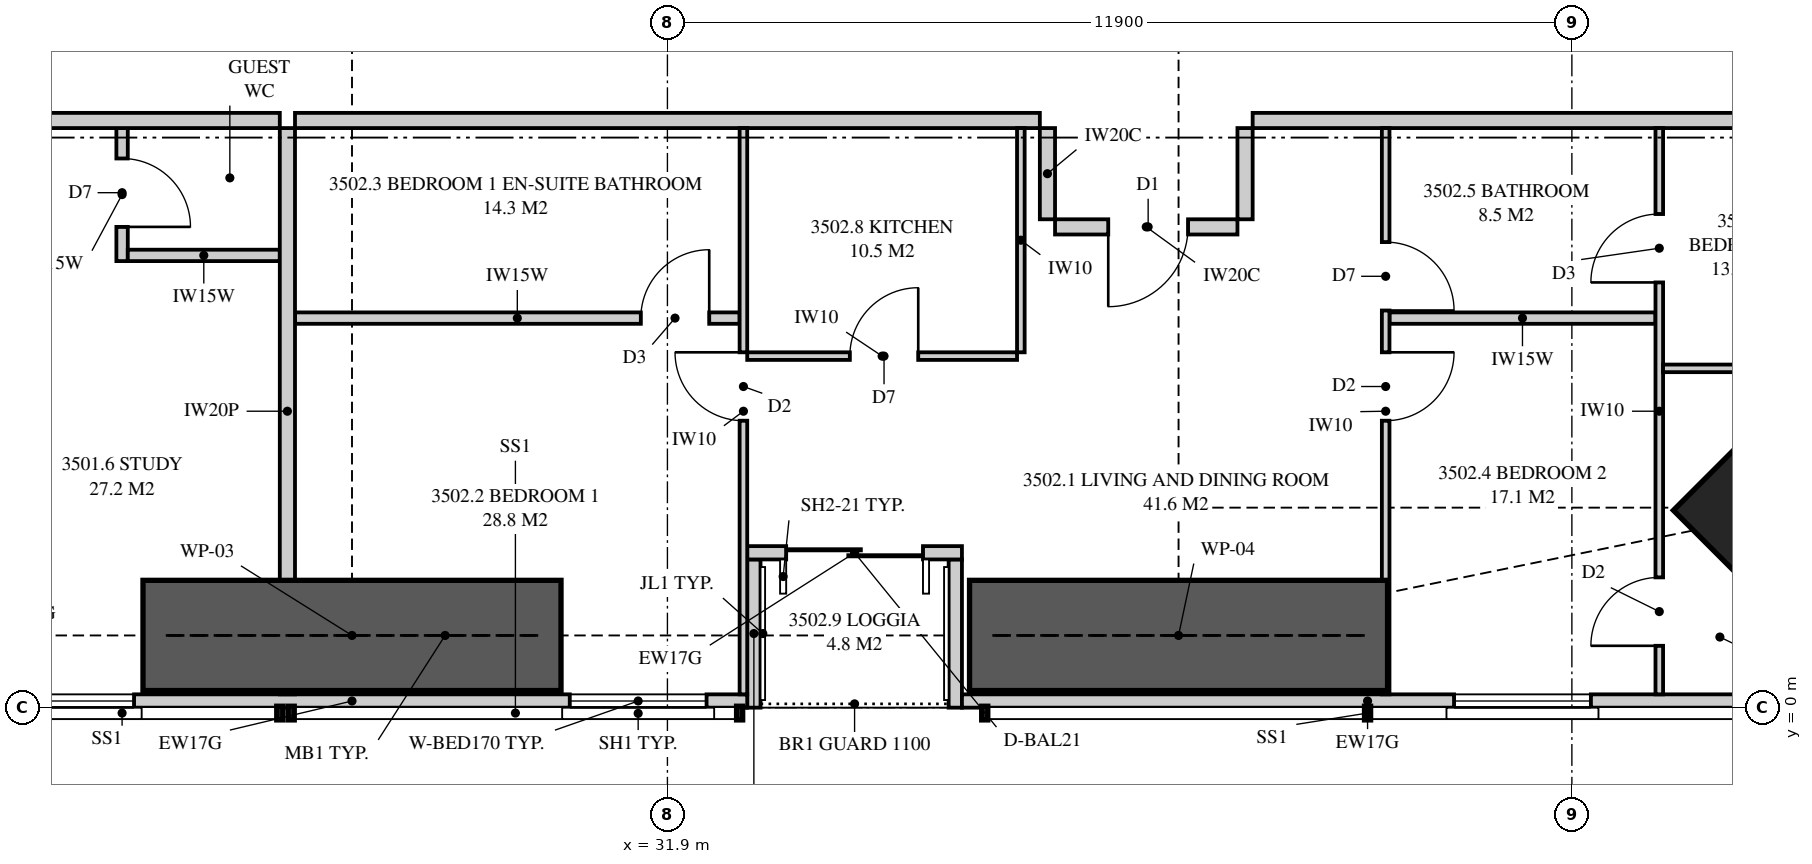
"""IFC4 building model, lengths in metres.
Left out: names, types, materials, properties, quantities, classifications, styles, units other than length and angle.
Written with IfcOpenShell. Run it as: python <this file> out.ifc"""

import sys

from ifc_helpers import new_model, si_unit, direction, frame, frame_2d, origin, origin_2d, place, context, subcontext, project, spatial, polyline, rectangle, outline, extrude, element, fill, save


model = new_model("IFC4")
c1 = context("Model", 3, precision=1e-05, world=origin(), true_north=direction((0.0, 1.0)))
c2 = subcontext(c1, "Body", "Model", "MODEL_VIEW")
j1 = project(units=[si_unit("LENGTHUNIT", "METRE"), si_unit("PLANEANGLEUNIT", "RADIAN")], contexts=[c1])
p1 = place(None, origin())
s1 = spatial("IfcSite", under=j1, at=p1, CompositionType="ELEMENT")
p2 = place(p1, origin())
s2 = spatial("IfcBuilding", under=s1, at=p2, CompositionType="ELEMENT")
p3 = place(p2, frame((0.0, 0.0, 128.3)))
s3 = spatial("IfcBuildingStorey", under=s2, at=p3, CompositionType="ELEMENT", Elevation=128.3)
p4 = place(p3, frame((46.869, 2.631, 0.0), z_axis=(0.0, 0.0, 1.0), x_axis=(-0.707106781187, 0.707106781187, 0.0)))
e1 = element("IfcColumn", 1, at=p4, inside=s3, PredefinedType="COLUMN", context=c2, shape_type="SweptSolid", body=[
    extrude(rectangle(XDim=2.4, YDim=2.5, at=origin_2d()), origin(), (0.0, 0.0, 1.0), 3.35),
])
p5 = place(p3, frame((22.55, 0.087, 0.0), z_axis=(0.0, 0.0, 1.0), x_axis=(1.0, 0.0, 0.0)))
e2 = element("IfcWall", 2, at=p5, inside=s3, PredefinedType="SOLIDWALL", context=c2, shape_type="SweptSolid", body=[
    extrude(rectangle(XDim=10.4, YDim=0.175, at=frame_2d((5.2, 0.0))), origin(), (0.0, 0.0, 1.0), 2.15),
])
p6 = place(p5, frame((0.532, 0.0, 0.4)))
e3 = element("IfcOpeningElement", 3, at=p6, cuts=e2, PredefinedType="OPENING", context=c2, shape_type="SweptSolid", body=[
    extrude(rectangle(XDim=1.8, YDim=1.7, at=frame_2d((0.9, 0.85))), frame((0.0, 0.097, 0.0), z_axis=(0.0, -1.0, 0.0), x_axis=(1.0, 0.0, 0.0)), (0.0, 0.0, 1.0), 0.195),
])
p7 = place(p5, frame((8.065, 0.0, 0.4)))
e4 = element("IfcOpeningElement", 4, at=p7, cuts=e2, PredefinedType="OPENING", context=c2, shape_type="SweptSolid", body=[
    extrude(rectangle(XDim=1.8, YDim=1.7, at=frame_2d((0.9, 0.85))), frame((0.0, 0.097, 0.0), z_axis=(0.0, -1.0, 0.0), x_axis=(1.0, 0.0, 0.0)), (0.0, 0.0, 1.0), 0.195),
])
p8 = place(p3, frame((35.775, 0.087, 0.0), z_axis=(0.0, 0.0, 1.0), x_axis=(1.0, 0.0, 0.0)))
e5 = element("IfcWall", 5, at=p8, inside=s3, PredefinedType="SOLIDWALL", context=c2, shape_type="SweptSolid", body=[
    extrude(outline(polyline([(0.0, 0.0), (10.674, 0.0), (10.674, 3.11), (3.053, 3.11), (3.053, 2.15), (3.008, 2.15), (3.008, 3.11), (2.85, 3.11), (2.85, 2.15), (0.0, 2.15), (0.0, 0.0)])), frame((0.0, 0.087, 0.0), z_axis=(0.0, -1.0, 0.0), x_axis=(1.0, 0.0, 0.0)), (0.0, 0.0, 1.0), 0.175),
])
p9 = place(p8, frame((6.475, 0.0, 0.4)))
e6 = element("IfcOpeningElement", 6, at=p9, cuts=e5, PredefinedType="OPENING", context=c2, shape_type="SweptSolid", body=[
    extrude(rectangle(XDim=1.8, YDim=1.7, at=frame_2d((0.9, 0.85))), frame((0.0, 0.097, 0.0), z_axis=(0.0, -1.0, 0.0), x_axis=(1.0, 0.0, 0.0)), (0.0, 0.0, 1.0), 0.195),
])
p10 = place(p3, frame((32.95, 2.038, 0.0), z_axis=(0.0, 0.0, 1.0), x_axis=(1.0, 0.0, 0.0)))
e7 = element("IfcWall", 7, at=p10, inside=s3, PredefinedType="SOLIDWALL", context=c2, shape_type="SweptSolid", body=[
    extrude(rectangle(XDim=2.825, YDim=0.175, at=frame_2d((1.413, 0.0))), origin(), (0.0, 0.0, 1.0), 3.11),
])
p11 = place(p10, frame((0.512, 0.0, 0.0)))
e8 = element("IfcOpeningElement", 8, at=p11, cuts=e7, PredefinedType="OPENING", context=c2, shape_type="SweptSolid", body=[
    extrude(rectangle(XDim=1.8, YDim=2.1, at=frame_2d((0.9, 1.05))), frame((0.0, 0.097, 0.0), z_axis=(0.0, -1.0, 0.0), x_axis=(1.0, 0.0, 0.0)), (0.0, 0.0, 1.0), 0.195),
])
for number, where, z_axis, x_axis in (
    (9, (33.038, 0.0, 0.0), (0.0, 0.0, 1.0), (0.0, 1.0, 0.0)),
    (10, (35.688, 0.0, 0.0), (0.0, 0.0, 1.0), (0.0, 1.0, 0.0)),
):
    element("IfcWall", number, at=place(p3, frame(where, z_axis=z_axis, x_axis=x_axis)), inside=s3, PredefinedType="SOLIDWALL", context=c2, shape_type="SweptSolid", body=[
        extrude(outline(polyline([(0.0, 0.0), (1.95, 0.0), (1.95, 3.11), (1.75, 3.11), (1.75, 2.15), (0.15, 2.15), (0.15, 3.11), (0.0, 3.11), (0.0, 0.0)])), frame((0.0, 0.087, 0.0), z_axis=(0.0, -1.0, 0.0), x_axis=(1.0, 0.0, 0.0)), (0.0, 0.0, 1.0), 0.175),
    ])
p12 = place(p3, frame((26.9, 0.175, 0.0), z_axis=(0.0, 0.0, 1.0), x_axis=(0.0, 1.0, 0.0)))
e11 = element("IfcWall", 11, at=p12, inside=s3, PredefinedType="PARTITIONING", context=c2, shape_type="SweptSolid", body=[
    extrude(outline(polyline([(0.529, 2.15), (0.0, 2.15), (0.0, 0.0), (0.529, 0.0), (0.529, 0.923), (1.021, 0.923), (1.021, 0.0), (7.45, 0.0), (7.45, 3.11), (1.685, 3.11), (1.685, 2.15), (1.021, 2.15), (1.021, 1.227), (0.529, 1.227), (0.529, 2.15)])), frame((0.0, 0.1, 0.0), z_axis=(0.0, -1.0, 0.0), x_axis=(1.0, 0.0, 0.0)), (0.0, 0.0, 1.0), 0.2),
])
p13 = place(p3, frame((17.775, 7.725, 0.0), z_axis=(0.0, 0.0, 1.0), x_axis=(1.0, 0.0, 0.0)))
e12 = element("IfcWall", 12, at=p13, inside=s3, PredefinedType="PARTITIONING", context=c2, shape_type="SweptSolid", body=[
    extrude(rectangle(XDim=9.025, YDim=0.2, at=frame_2d((4.513, 0.0))), origin(), (0.0, 0.0, 1.0), 3.11),
])
p14 = place(p13, frame((0.2, 0.0, 0.0)))
e13 = element("IfcOpeningElement", 13, at=p14, cuts=e12, PredefinedType="OPENING", context=c2, shape_type="SweptSolid", body=[
    extrude(rectangle(XDim=1.05, YDim=2.2, at=frame_2d((0.525, 1.1))), frame((0.0, 0.11, 0.0), z_axis=(0.0, -1.0, 0.0), x_axis=(1.0, 0.0, 0.0)), (0.0, 0.0, 1.0), 0.22),
])
p15 = place(p3, frame((27.0, 7.725, 0.0), z_axis=(0.0, 0.0, 1.0), x_axis=(1.0, 0.0, 0.0)))
e14 = element("IfcWall", 14, at=p15, inside=s3, PredefinedType="PARTITIONING", context=c2, shape_type="SweptSolid", body=[
    extrude(outline(polyline([(0.0, 0.0), (9.8, 0.0), (9.8, 3.11), (1.087, 3.11), (1.087, 2.541), (0.413, 2.541), (0.413, 3.11), (0.0, 3.11), (0.0, 0.0)])), frame((0.0, 0.1, 0.0), z_axis=(0.0, -1.0, 0.0), x_axis=(1.0, 0.0, 0.0)), (0.0, 0.0, 1.0), 0.2),
])
p16 = place(p3, frame((32.9, 0.175, 0.0), z_axis=(0.0, 0.0, 1.0), x_axis=(0.0, 1.0, 0.0)))
e15 = element("IfcWall", 15, at=p16, inside=s3, PredefinedType="PARTITIONING", context=c2, shape_type="SweptSolid", body=[
    extrude(outline(polyline([(0.0, 0.0), (7.45, 0.0), (7.45, 3.11), (1.635, 3.11), (1.635, 2.15), (0.0, 2.15), (0.0, 3.11), (0.0, 0.0)])), frame((0.0, 0.05, 0.0), z_axis=(0.0, -1.0, 0.0), x_axis=(1.0, 0.0, 0.0)), (0.0, 0.0, 1.0), 0.1),
])
p17 = place(p16, frame((3.6, 0.0, 0.0)))
e16 = element("IfcOpeningElement", 16, at=p17, cuts=e15, PredefinedType="OPENING", context=c2, shape_type="SweptSolid", body=[
    extrude(rectangle(XDim=0.9, YDim=2.1, at=frame_2d((0.45, 1.05))), frame((0.0, 0.06, 0.0), z_axis=(0.0, -1.0, 0.0), x_axis=(1.0, 0.0, 0.0)), (0.0, 0.0, 1.0), 0.12),
])
p18 = place(p3, frame((41.35, 0.175, 0.0), z_axis=(0.0, 0.0, 1.0), x_axis=(0.0, 1.0, 0.0)))
e17 = element("IfcWall", 17, at=p18, inside=s3, PredefinedType="PARTITIONING", context=c2, shape_type="SweptSolid", body=[
    extrude(outline(polyline([(0.0, 0.0), (7.45, 0.0), (7.45, 3.11), (3.716, 3.11), (3.716, 2.51), (2.208, 2.51), (2.208, 2.15), (0.453, 2.15), (0.453, 3.11), (0.0, 3.11), (0.0, 0.0)])), frame((0.0, 0.05, 0.0), z_axis=(0.0, -1.0, 0.0), x_axis=(1.0, 0.0, 0.0)), (0.0, 0.0, 1.0), 0.1),
])
p19 = place(p18, frame((3.6, 0.0, 0.0)))
e18 = element("IfcOpeningElement", 18, at=p19, cuts=e17, PredefinedType="OPENING", context=c2, shape_type="SweptSolid", body=[
    extrude(rectangle(XDim=0.9, YDim=2.1, at=frame_2d((0.45, 1.05))), frame((0.0, 0.06, 0.0), z_axis=(0.0, -1.0, 0.0), x_axis=(1.0, 0.0, 0.0)), (0.0, 0.0, 1.0), 0.12),
])
p20 = place(p18, frame((5.05, 0.0, 0.0)))
e19 = element("IfcOpeningElement", 19, at=p20, cuts=e17, PredefinedType="OPENING", context=c2, shape_type="SweptSolid", body=[
    extrude(rectangle(XDim=0.9, YDim=2.1, at=frame_2d((0.45, 1.05))), frame((0.0, 0.06, 0.0), z_axis=(0.0, -1.0, 0.0), x_axis=(1.0, 0.0, 0.0)), (0.0, 0.0, 1.0), 0.12),
])
p21 = place(p3, frame((44.95, 0.175, 0.0), z_axis=(0.0, 0.0, 1.0), x_axis=(0.0, 1.0, 0.0)))
e20 = element("IfcWall", 20, at=p21, inside=s3, PredefinedType="PARTITIONING", context=c2, shape_type="SweptSolid", body=[
    extrude(outline(polyline([(0.0, 0.0), (7.45, 0.0), (7.45, 3.11), (3.716, 3.11), (3.716, 2.51), (2.943, 2.51), (2.943, 2.15), (1.188, 2.15), (1.188, 3.11), (0.0, 3.11), (0.0, 0.0)])), frame((0.0, 0.05, 0.0), z_axis=(0.0, -1.0, 0.0), x_axis=(1.0, 0.0, 0.0)), (0.0, 0.0, 1.0), 0.1),
])
p22 = place(p21, frame((0.639, 0.0, 0.0)))
e21 = element("IfcOpeningElement", 21, at=p22, cuts=e20, PredefinedType="OPENING", context=c2, shape_type="SweptSolid", body=[
    extrude(rectangle(XDim=0.9, YDim=2.1, at=frame_2d((0.45, 1.05))), frame((0.0, 0.06, 0.0), z_axis=(0.0, -1.0, 0.0), x_axis=(1.0, 0.0, 0.0)), (0.0, 0.0, 1.0), 0.12),
])
p23 = place(p21, frame((5.419, 0.0, 0.0)))
e22 = element("IfcOpeningElement", 22, at=p23, cuts=e20, PredefinedType="OPENING", context=c2, shape_type="SweptSolid", body=[
    extrude(rectangle(XDim=0.9, YDim=2.1, at=frame_2d((0.45, 1.05))), frame((0.0, 0.06, 0.0), z_axis=(0.0, -1.0, 0.0), x_axis=(1.0, 0.0, 0.0)), (0.0, 0.0, 1.0), 0.12),
])
p24 = place(p3, frame((27.0, 5.125, 0.0), z_axis=(0.0, 0.0, 1.0), x_axis=(1.0, 0.0, 0.0)))
e23 = element("IfcWall", 23, at=p24, inside=s3, PredefinedType="PLUMBINGWALL", context=c2, shape_type="SweptSolid", body=[
    extrude(outline(polyline([(0.0, 0.0), (5.85, 0.0), (5.85, 3.11), (1.062, 3.11), (1.062, 2.541), (0.438, 2.541), (0.438, 3.11), (0.0, 3.11), (0.0, 0.0)])), frame((0.0, 0.075, 0.0), z_axis=(0.0, -1.0, 0.0), x_axis=(1.0, 0.0, 0.0)), (0.0, 0.0, 1.0), 0.15),
])
p25 = place(p24, frame((4.55, 0.0, 0.0)))
e24 = element("IfcOpeningElement", 24, at=p25, cuts=e23, PredefinedType="OPENING", context=c2, shape_type="SweptSolid", body=[
    extrude(rectangle(XDim=0.9, YDim=2.1, at=frame_2d((0.45, 1.05))), frame((0.0, 0.085, 0.0), z_axis=(0.0, -1.0, 0.0), x_axis=(1.0, 0.0, 0.0)), (0.0, 0.0, 1.0), 0.17),
])
p26 = place(p3, frame((41.4, 5.125, 0.0), z_axis=(0.0, 0.0, 1.0), x_axis=(1.0, 0.0, 0.0)))
e25 = element("IfcWall", 25, at=p26, inside=s3, PredefinedType="PLUMBINGWALL", context=c2, shape_type="SweptSolid", body=[
    extrude(rectangle(XDim=3.5, YDim=0.15, at=frame_2d((1.75, 0.0))), origin(), (0.0, 0.0, 1.0), 3.11),
])
p27 = place(p3, frame((45.0, 4.464, 0.0), z_axis=(0.0, 0.0, 1.0), x_axis=(1.0, 0.0, 0.0)))
e26 = element("IfcWall", 26, at=p27, inside=s3, PredefinedType="PARTITIONING", context=c2, shape_type="SweptSolid", body=[
    extrude(outline(polyline([(0.0, 0.0), (4.5, 0.0), (4.5, 3.11), (3.037, 3.11), (3.037, 2.15), (1.294, 2.15), (1.294, 3.11), (0.0, 3.11), (0.0, 0.0)])), frame((0.0, 0.05, 0.0), z_axis=(0.0, -1.0, 0.0), x_axis=(1.0, 0.0, 0.0)), (0.0, 0.0, 1.0), 0.1),
])
p28 = place(p27, frame((2.9, 0.0, 0.0)))
e27 = element("IfcOpeningElement", 27, at=p28, cuts=e26, PredefinedType="OPENING", context=c2, shape_type="SweptSolid", body=[
    extrude(rectangle(XDim=0.9, YDim=2.1, at=frame_2d((0.45, 1.05))), frame((0.0, 0.06, 0.0), z_axis=(0.0, -1.0, 0.0), x_axis=(1.0, 0.0, 0.0)), (0.0, 0.0, 1.0), 0.12),
])
p29 = place(p3, frame((32.95, 4.625, 0.0), z_axis=(0.0, 0.0, 1.0), x_axis=(1.0, 0.0, 0.0)))
e28 = element("IfcWall", 28, at=p29, inside=s3, PredefinedType="PARTITIONING", context=c2, shape_type="SweptSolid", body=[
    extrude(rectangle(XDim=3.55, YDim=0.1, at=frame_2d((1.775, 0.0))), origin(), (0.0, 0.0, 1.0), 3.11),
])
p30 = place(p29, frame((1.35, 0.0, 0.0)))
e29 = element("IfcOpeningElement", 29, at=p30, cuts=e28, PredefinedType="OPENING", context=c2, shape_type="SweptSolid", body=[
    extrude(rectangle(XDim=0.9, YDim=2.1, at=frame_2d((0.45, 1.05))), frame((0.0, 0.06, 0.0), z_axis=(0.0, -1.0, 0.0), x_axis=(1.0, 0.0, 0.0)), (0.0, 0.0, 1.0), 0.12),
])
p31 = place(p3, frame((36.55, 4.675, 0.0), z_axis=(0.0, 0.0, 1.0), x_axis=(0.0, 1.0, 0.0)))
e30 = element("IfcWall", 30, at=p31, inside=s3, PredefinedType="PARTITIONING", context=c2, shape_type="SweptSolid", body=[
    extrude(rectangle(XDim=2.95, YDim=0.1, at=frame_2d((1.475, 0.0))), origin(), (0.0, 0.0, 1.0), 3.11),
])
p32 = place(p3, frame((39.6, 7.725, 0.0), z_axis=(0.0, 0.0, 1.0), x_axis=(1.0, 0.0, 0.0)))
e31 = element("IfcWall", 31, at=p32, inside=s3, PredefinedType="PARTITIONING", context=c2, shape_type="SweptSolid", body=[
    extrude(rectangle(XDim=6.425, YDim=0.2, at=frame_2d((3.212, 0.0))), origin(), (0.0, 0.0, 1.0), 3.11),
])
p33 = place(p3, frame((37.0, 6.325, 0.0), z_axis=(0.0, 0.0, 1.0), x_axis=(1.0, 0.0, 0.0)))
e32 = element("IfcWall", 32, at=p33, inside=s3, PredefinedType="PARTITIONING", context=c2, shape_type="SweptSolid", body=[
    extrude(outline(polyline([(0.0, 0.0), (2.4, 0.0), (2.4, 3.11), (1.962, 3.11), (1.962, 2.541), (1.288, 2.541), (1.288, 3.11), (0.0, 3.11), (0.0, 0.0)])), frame((0.0, 0.1, 0.0), z_axis=(0.0, -1.0, 0.0), x_axis=(1.0, 0.0, 0.0)), (0.0, 0.0, 1.0), 0.2),
])
p34 = place(p33, frame((0.7, 0.0, 0.0)))
e33 = element("IfcOpeningElement", 33, at=p34, cuts=e32, PredefinedType="OPENING", context=c2, shape_type="SweptSolid", body=[
    extrude(rectangle(XDim=1.05, YDim=2.2, at=frame_2d((0.525, 1.1))), frame((0.0, 0.11, 0.0), z_axis=(0.0, -1.0, 0.0), x_axis=(1.0, 0.0, 0.0)), (0.0, 0.0, 1.0), 0.22),
])
for number, where, z_axis, x_axis in (
    (34, (36.9, 7.625, 0.0), (0.0, 0.0, 1.0), (0.0, -1.0, 0.0)),
    (35, (39.5, 7.625, 0.0), (0.0, 0.0, 1.0), (0.0, -1.0, 0.0)),
):
    element("IfcWall", number, at=place(p3, frame(where, z_axis=z_axis, x_axis=x_axis)), inside=s3, PredefinedType="PARTITIONING", context=c2, shape_type="SweptSolid", body=[
        extrude(rectangle(XDim=1.2, YDim=0.2, at=frame_2d((0.6, 0.0))), origin(), (0.0, 0.0, 1.0), 3.11),
    ])
p35 = place(p3, frame((24.725, 7.625, 0.0), z_axis=(0.0, 0.0, 1.0), x_axis=(0.0, -1.0, 0.0)))
e36 = element("IfcWall", 36, at=p35, inside=s3, PredefinedType="PLUMBINGWALL", context=c2, shape_type="SweptSolid", body=[
    extrude(rectangle(XDim=1.75, YDim=0.15, at=frame_2d((0.875, 0.0))), origin(), (0.0, 0.0, 1.0), 3.11),
])
p36 = place(p35, frame((0.4, 0.0, 0.0)))
e37 = element("IfcOpeningElement", 37, at=p36, cuts=e36, PredefinedType="OPENING", context=c2, shape_type="SweptSolid", body=[
    extrude(rectangle(XDim=0.9, YDim=2.1, at=frame_2d((0.45, 1.05))), frame((0.0, 0.085, 0.0), z_axis=(0.0, -1.0, 0.0), x_axis=(1.0, 0.0, 0.0)), (0.0, 0.0, 1.0), 0.17),
])
p37 = place(p3, frame((26.8, 5.95, 0.0), z_axis=(0.0, 0.0, 1.0), x_axis=(-1.0, 0.0, 0.0)))
e38 = element("IfcWall", 38, at=p37, inside=s3, PredefinedType="PLUMBINGWALL", context=c2, shape_type="SweptSolid", body=[
    extrude(rectangle(XDim=2.0, YDim=0.15, at=frame_2d((1.0, 0.0))), origin(), (0.0, 0.0, 1.0), 3.11),
])
for number, where, z_axis, x_axis in (
    (39, (25.0, 0.95, 0.0), (0.0, 0.0, 1.0), (1.0, 0.0, 0.0)),
    (40, (35.875, 0.95, 0.0), (0.0, 0.0, 1.0), (1.0, 0.0, 0.0)),
):
    element("IfcWall", number, at=place(p3, frame(where, z_axis=z_axis, x_axis=x_axis)), inside=s3, PredefinedType="SHEAR", context=c2, shape_type="SweptSolid", body=[
        extrude(rectangle(XDim=5.5, YDim=1.45, at=frame_2d((2.75, 0.0))), origin(), (0.0, 0.0, 1.0), 3.35),
    ])
p38 = place(p6, origin())
e41 = element("IfcWindow", 41, at=p38, inside=s3, PartitioningType="SINGLE_PANEL", PredefinedType="WINDOW", context=c2, shape_type="SweptSolid", body=[
    extrude(rectangle(XDim=1.8, YDim=1.7, at=frame_2d((0.9, 0.85))), frame((0.0, 0.03, 0.0), z_axis=(0.0, -1.0, 0.0), x_axis=(1.0, 0.0, 0.0)), (0.0, 0.0, 1.0), 0.06),
])
fill(e3, e41)
p39 = place(p7, origin())
e42 = element("IfcWindow", 42, at=p39, inside=s3, PartitioningType="SINGLE_PANEL", PredefinedType="WINDOW", context=c2, shape_type="SweptSolid", body=[
    extrude(rectangle(XDim=1.8, YDim=1.7, at=frame_2d((0.9, 0.85))), frame((0.0, 0.03, 0.0), z_axis=(0.0, -1.0, 0.0), x_axis=(1.0, 0.0, 0.0)), (0.0, 0.0, 1.0), 0.06),
])
fill(e4, e42)
p40 = place(p11, origin())
e43 = element("IfcDoor", 43, at=p40, inside=s3, OperationType="SLIDING_TO_LEFT", PredefinedType="DOOR", context=c2, shape_type="SweptSolid", body=[
    extrude(rectangle(XDim=1.8, YDim=2.1, at=frame_2d((0.9, 1.05))), frame((0.0, 0.025, 0.0), z_axis=(0.0, -1.0, 0.0), x_axis=(1.0, 0.0, 0.0)), (0.0, 0.0, 1.0), 0.05),
])
fill(e8, e43)
p41 = place(p9, origin())
e44 = element("IfcWindow", 44, at=p41, inside=s3, PartitioningType="SINGLE_PANEL", PredefinedType="WINDOW", context=c2, shape_type="SweptSolid", body=[
    extrude(rectangle(XDim=1.8, YDim=1.7, at=frame_2d((0.9, 0.85))), frame((0.0, 0.03, 0.0), z_axis=(0.0, -1.0, 0.0), x_axis=(1.0, 0.0, 0.0)), (0.0, 0.0, 1.0), 0.06),
])
fill(e6, e44)
p42 = place(p34, frame((1.05, 0.0, 0.0), z_axis=(0.0, 0.0, 1.0), x_axis=(-1.0, 0.0, 0.0)))
e45 = element("IfcDoor", 45, at=p42, inside=s3, OperationType="SINGLE_SWING_RIGHT", PredefinedType="DOOR", context=c2, shape_type="SweptSolid", body=[
    extrude(rectangle(XDim=1.05, YDim=2.2, at=frame_2d((0.525, 1.1))), frame((0.0, 0.025, 0.0), z_axis=(0.0, -1.0, 0.0), x_axis=(1.0, 0.0, 0.0)), (0.0, 0.0, 1.0), 0.05),
])
fill(e33, e45)
p43 = place(p17, origin())
e46 = element("IfcDoor", 46, at=p43, inside=s3, OperationType="SINGLE_SWING_RIGHT", PredefinedType="DOOR", context=c2, shape_type="SweptSolid", body=[
    extrude(rectangle(XDim=0.9, YDim=2.1, at=frame_2d((0.45, 1.05))), frame((0.0, 0.025, 0.0), z_axis=(0.0, -1.0, 0.0), x_axis=(1.0, 0.0, 0.0)), (0.0, 0.0, 1.0), 0.05),
])
fill(e16, e46)
p44 = place(p25, origin())
e47 = element("IfcDoor", 47, at=p44, inside=s3, OperationType="SINGLE_SWING_RIGHT", PredefinedType="DOOR", context=c2, shape_type="SweptSolid", body=[
    extrude(rectangle(XDim=0.9, YDim=2.1, at=frame_2d((0.45, 1.05))), frame((0.0, 0.025, 0.0), z_axis=(0.0, -1.0, 0.0), x_axis=(1.0, 0.0, 0.0)), (0.0, 0.0, 1.0), 0.05),
])
fill(e24, e47)
p45 = place(p19, frame((0.9, 0.0, 0.0), z_axis=(0.0, 0.0, 1.0), x_axis=(-1.0, 0.0, 0.0)))
e48 = element("IfcDoor", 48, at=p45, inside=s3, OperationType="SINGLE_SWING_LEFT", PredefinedType="DOOR", context=c2, shape_type="SweptSolid", body=[
    extrude(rectangle(XDim=0.9, YDim=2.1, at=frame_2d((0.45, 1.05))), frame((0.0, 0.025, 0.0), z_axis=(0.0, -1.0, 0.0), x_axis=(1.0, 0.0, 0.0)), (0.0, 0.0, 1.0), 0.05),
])
fill(e18, e48)
p46 = place(p20, frame((0.9, 0.0, 0.0), z_axis=(0.0, 0.0, 1.0), x_axis=(-1.0, 0.0, 0.0)))
e49 = element("IfcDoor", 49, at=p46, inside=s3, OperationType="SINGLE_SWING_RIGHT", PredefinedType="DOOR", context=c2, shape_type="SweptSolid", body=[
    extrude(rectangle(XDim=0.9, YDim=2.1, at=frame_2d((0.45, 1.05))), frame((0.0, 0.025, 0.0), z_axis=(0.0, -1.0, 0.0), x_axis=(1.0, 0.0, 0.0)), (0.0, 0.0, 1.0), 0.05),
])
fill(e19, e49)
p47 = place(p22, origin())
e50 = element("IfcDoor", 50, at=p47, inside=s3, OperationType="SINGLE_SWING_LEFT", PredefinedType="DOOR", context=c2, shape_type="SweptSolid", body=[
    extrude(rectangle(XDim=0.9, YDim=2.1, at=frame_2d((0.45, 1.05))), frame((0.0, 0.025, 0.0), z_axis=(0.0, -1.0, 0.0), x_axis=(1.0, 0.0, 0.0)), (0.0, 0.0, 1.0), 0.05),
])
fill(e21, e50)
p48 = place(p23, origin())
e51 = element("IfcDoor", 51, at=p48, inside=s3, OperationType="SINGLE_SWING_LEFT", PredefinedType="DOOR", context=c2, shape_type="SweptSolid", body=[
    extrude(rectangle(XDim=0.9, YDim=2.1, at=frame_2d((0.45, 1.05))), frame((0.0, 0.025, 0.0), z_axis=(0.0, -1.0, 0.0), x_axis=(1.0, 0.0, 0.0)), (0.0, 0.0, 1.0), 0.05),
])
fill(e22, e51)
p49 = place(p30, origin())
e52 = element("IfcDoor", 52, at=p49, inside=s3, OperationType="SINGLE_SWING_RIGHT", PredefinedType="DOOR", context=c2, shape_type="SweptSolid", body=[
    extrude(rectangle(XDim=0.9, YDim=2.1, at=frame_2d((0.45, 1.05))), frame((0.0, 0.025, 0.0), z_axis=(0.0, -1.0, 0.0), x_axis=(1.0, 0.0, 0.0)), (0.0, 0.0, 1.0), 0.05),
])
fill(e29, e52)
p50 = place(p36, origin())
e53 = element("IfcDoor", 53, at=p50, inside=s3, OperationType="SINGLE_SWING_RIGHT", PredefinedType="DOOR", context=c2, shape_type="SweptSolid", body=[
    extrude(rectangle(XDim=0.9, YDim=2.1, at=frame_2d((0.45, 1.05))), frame((0.0, 0.025, 0.0), z_axis=(0.0, -1.0, 0.0), x_axis=(1.0, 0.0, 0.0)), (0.0, 0.0, 1.0), 0.05),
])
fill(e37, e53)
save(model, sys.argv[1])
